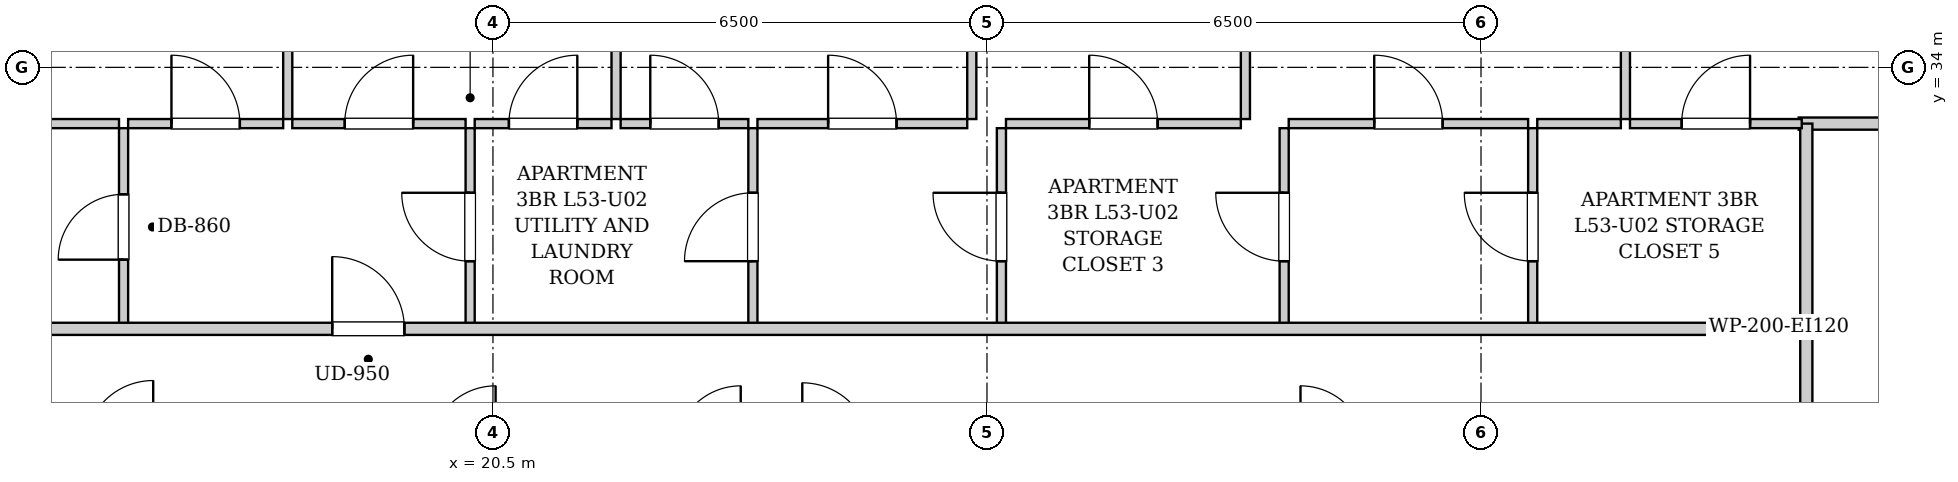
"""IFC4 building model, lengths in metres.
Left out: names, types, materials, properties, quantities, classifications, styles, units other than length and angle.
Written with IfcOpenShell. Run it as: python <this file> out.ifc"""

import sys

from ifc_helpers import new_model, si_unit, direction, frame, frame_2d, origin, place, context, subcontext, project, spatial, rectangle, extrude, element, fill, save


model = new_model("IFC4")
c1 = context("Model", 3, precision=1e-05, world=origin(), true_north=direction((0.0, 1.0)))
c2 = subcontext(c1, "Body", "Model", "MODEL_VIEW")
j1 = project(units=[si_unit("LENGTHUNIT", "METRE"), si_unit("PLANEANGLEUNIT", "RADIAN")], contexts=[c1])
p1 = place(None, origin())
s1 = spatial("IfcSite", under=j1, at=p1, CompositionType="ELEMENT")
p2 = place(p1, origin())
s2 = spatial("IfcBuilding", under=s1, at=p2, CompositionType="ELEMENT")
p3 = place(p2, frame((0.0, 0.0, 184.3)))
s3 = spatial("IfcBuildingStorey", under=s2, at=p3, CompositionType="ELEMENT", Elevation=184.3)
p4 = place(p3, frame((37.78, 28.98, 0.0), z_axis=(0.0, 0.0, 1.0), x_axis=(0.0, 1.0, 0.0)))
e1 = element("IfcWall", 1, at=p4, inside=s3, PredefinedType="PARTITIONING", context=c2, shape_type="SweptSolid", body=[
    extrude(rectangle(XDim=1.58, YDim=0.16, at=frame_2d((0.79, 0.0))), origin(), (0.0, 0.0, 1.0), 3.04),
])
p5 = place(p3, frame((37.68, 33.26, 0.0), z_axis=(0.0, 0.0, 1.0), x_axis=(1.0, 0.0, 0.0)))
e2 = element("IfcWall", 2, at=p5, inside=s3, PredefinedType="PARTITIONING", context=c2, shape_type="SweptSolid", body=[
    extrude(rectangle(XDim=2.34, YDim=0.16, at=frame_2d((1.17, 0.0))), origin(), (0.0, 0.0, 1.0), 3.04),
])
p6 = place(p3, frame((37.78, 30.6, 0.0), z_axis=(0.0, 0.0, 1.0), x_axis=(0.0, 1.0, 0.0)))
e3 = element("IfcWall", 3, at=p6, inside=s3, PredefinedType="PARTITIONING", context=c2, shape_type="SweptSolid", body=[
    extrude(rectangle(XDim=2.66, YDim=0.16, at=frame_2d((1.33, 0.0))), origin(), (0.0, 0.0, 1.0), 3.04),
])
p7 = place(p3, frame((15.64, 30.6, 0.0), z_axis=(0.0, 0.0, 1.0), x_axis=(0.0, 1.0, 0.0)))
e4 = element("IfcWall", 4, at=p7, inside=s3, PredefinedType="PARTITIONING", context=c2, shape_type="SweptSolid", body=[
    extrude(rectangle(XDim=2.6, YDim=0.12, at=frame_2d((1.3, 0.0))), origin(), (0.0, 0.0, 1.0), 3.04),
])
p8 = place(p7, frame((0.87, 0.0, 0.0)))
e5 = element("IfcOpeningElement", 5, at=p8, cuts=e4, PredefinedType="OPENING", context=c2, shape_type="SweptSolid", body=[
    extrude(rectangle(XDim=0.86, YDim=2.05, at=frame_2d((0.43, 1.025))), frame((0.0, 0.07, 0.0), z_axis=(0.0, -1.0, 0.0), x_axis=(1.0, 0.0, 0.0)), (0.0, 0.0, 1.0), 0.14),
])
p9 = place(p3, frame((13.18, 33.26, 0.0), z_axis=(0.0, 0.0, 1.0), x_axis=(1.0, 0.0, 0.0)))
e6 = element("IfcWall", 6, at=p9, inside=s3, PredefinedType="PARTITIONING", context=c2, shape_type="SweptSolid", body=[
    extrude(rectangle(XDim=2.4, YDim=0.12, at=frame_2d((1.2, 0.0))), origin(), (0.0, 0.0, 1.0), 3.04),
])
p10 = place(p3, frame((20.2, 30.6, 0.0), z_axis=(0.0, 0.0, 1.0), x_axis=(0.0, 1.0, 0.0)))
e7 = element("IfcWall", 7, at=p10, inside=s3, PredefinedType="PARTITIONING", context=c2, shape_type="SweptSolid", body=[
    extrude(rectangle(XDim=2.6, YDim=0.12, at=frame_2d((1.3, 0.0))), origin(), (0.0, 0.0, 1.0), 3.04),
])
p11 = place(p10, frame((0.85, 0.0, 0.0)))
e8 = element("IfcOpeningElement", 8, at=p11, cuts=e7, PredefinedType="OPENING", context=c2, shape_type="SweptSolid", body=[
    extrude(rectangle(XDim=0.9, YDim=2.05, at=frame_2d((0.45, 1.025))), frame((0.0, 0.07, 0.0), z_axis=(0.0, -1.0, 0.0), x_axis=(1.0, 0.0, 0.0)), (0.0, 0.0, 1.0), 0.14),
])
p12 = place(p3, frame((15.7, 33.26, 0.0), z_axis=(0.0, 0.0, 1.0), x_axis=(1.0, 0.0, 0.0)))
e9 = element("IfcWall", 9, at=p12, inside=s3, PredefinedType="PARTITIONING", context=c2, shape_type="SweptSolid", body=[
    extrude(rectangle(XDim=2.04, YDim=0.12, at=frame_2d((1.02, 0.0))), origin(), (0.0, 0.0, 1.0), 3.04),
])
p13 = place(p12, frame((0.57, 0.0, 0.0)))
e10 = element("IfcOpeningElement", 10, at=p13, cuts=e9, PredefinedType="OPENING", context=c2, shape_type="SweptSolid", body=[
    extrude(rectangle(XDim=0.9, YDim=2.05, at=frame_2d((0.45, 1.025))), frame((0.0, 0.07, 0.0), z_axis=(0.0, -1.0, 0.0), x_axis=(1.0, 0.0, 0.0)), (0.0, 0.0, 1.0), 0.14),
])
p14 = place(p3, frame((17.86, 33.26, 0.0), z_axis=(0.0, 0.0, 1.0), x_axis=(1.0, 0.0, 0.0)))
e11 = element("IfcWall", 11, at=p14, inside=s3, PredefinedType="PARTITIONING", context=c2, shape_type="SweptSolid", body=[
    extrude(rectangle(XDim=2.28, YDim=0.12, at=frame_2d((1.14, 0.0))), origin(), (0.0, 0.0, 1.0), 3.04),
])
p15 = place(p14, frame((0.69, 0.0, 0.0)))
e12 = element("IfcOpeningElement", 12, at=p15, cuts=e11, PredefinedType="OPENING", context=c2, shape_type="SweptSolid", body=[
    extrude(rectangle(XDim=0.9, YDim=2.05, at=frame_2d((0.45, 1.025))), frame((0.0, 0.07, 0.0), z_axis=(0.0, -1.0, 0.0), x_axis=(1.0, 0.0, 0.0)), (0.0, 0.0, 1.0), 0.14),
])
p16 = place(p3, frame((23.92, 30.6, 0.0), z_axis=(0.0, 0.0, 1.0), x_axis=(0.0, 1.0, 0.0)))
e13 = element("IfcWall", 13, at=p16, inside=s3, PredefinedType="PARTITIONING", context=c2, shape_type="SweptSolid", body=[
    extrude(rectangle(XDim=2.6, YDim=0.12, at=frame_2d((1.3, 0.0))), origin(), (0.0, 0.0, 1.0), 3.04),
])
p17 = place(p16, frame((0.85, 0.0, 0.0)))
e14 = element("IfcOpeningElement", 14, at=p17, cuts=e13, PredefinedType="OPENING", context=c2, shape_type="SweptSolid", body=[
    extrude(rectangle(XDim=0.9, YDim=2.05, at=frame_2d((0.45, 1.025))), frame((0.0, 0.07, 0.0), z_axis=(0.0, -1.0, 0.0), x_axis=(1.0, 0.0, 0.0)), (0.0, 0.0, 1.0), 0.14),
])
p18 = place(p3, frame((20.26, 33.26, 0.0), z_axis=(0.0, 0.0, 1.0), x_axis=(1.0, 0.0, 0.0)))
e15 = element("IfcWall", 15, at=p18, inside=s3, PredefinedType="PARTITIONING", context=c2, shape_type="SweptSolid", body=[
    extrude(rectangle(XDim=1.8, YDim=0.12, at=frame_2d((0.9, 0.0))), origin(), (0.0, 0.0, 1.0), 3.04),
])
p19 = place(p18, frame((0.45, 0.0, 0.0)))
e16 = element("IfcOpeningElement", 16, at=p19, cuts=e15, PredefinedType="OPENING", context=c2, shape_type="SweptSolid", body=[
    extrude(rectangle(XDim=0.9, YDim=2.05, at=frame_2d((0.45, 1.025))), frame((0.0, 0.07, 0.0), z_axis=(0.0, -1.0, 0.0), x_axis=(1.0, 0.0, 0.0)), (0.0, 0.0, 1.0), 0.14),
])
p20 = place(p3, frame((22.18, 33.26, 0.0), z_axis=(0.0, 0.0, 1.0), x_axis=(1.0, 0.0, 0.0)))
e17 = element("IfcWall", 17, at=p20, inside=s3, PredefinedType="PARTITIONING", context=c2, shape_type="SweptSolid", body=[
    extrude(rectangle(XDim=1.68, YDim=0.12, at=frame_2d((0.84, 0.0))), origin(), (0.0, 0.0, 1.0), 3.04),
])
p21 = place(p20, frame((0.39, 0.0, 0.0)))
e18 = element("IfcOpeningElement", 18, at=p21, cuts=e17, PredefinedType="OPENING", context=c2, shape_type="SweptSolid", body=[
    extrude(rectangle(XDim=0.9, YDim=2.05, at=frame_2d((0.45, 1.025))), frame((0.0, 0.07, 0.0), z_axis=(0.0, -1.0, 0.0), x_axis=(1.0, 0.0, 0.0)), (0.0, 0.0, 1.0), 0.14),
])
p22 = place(p3, frame((27.19, 30.6, 0.0), z_axis=(0.0, 0.0, 1.0), x_axis=(0.0, 1.0, 0.0)))
e19 = element("IfcWall", 19, at=p22, inside=s3, PredefinedType="PARTITIONING", context=c2, shape_type="SweptSolid", body=[
    extrude(rectangle(XDim=2.6, YDim=0.12, at=frame_2d((1.3, 0.0))), origin(), (0.0, 0.0, 1.0), 3.04),
])
p23 = place(p22, frame((0.85, 0.0, 0.0)))
e20 = element("IfcOpeningElement", 20, at=p23, cuts=e19, PredefinedType="OPENING", context=c2, shape_type="SweptSolid", body=[
    extrude(rectangle(XDim=0.9, YDim=2.05, at=frame_2d((0.45, 1.025))), frame((0.0, 0.07, 0.0), z_axis=(0.0, -1.0, 0.0), x_axis=(1.0, 0.0, 0.0)), (0.0, 0.0, 1.0), 0.14),
])
p24 = place(p3, frame((23.98, 33.26, 0.0), z_axis=(0.0, 0.0, 1.0), x_axis=(1.0, 0.0, 0.0)))
e21 = element("IfcWall", 21, at=p24, inside=s3, PredefinedType="PARTITIONING", context=c2, shape_type="SweptSolid", body=[
    extrude(rectangle(XDim=2.76, YDim=0.12, at=frame_2d((1.38, 0.0))), origin(), (0.0, 0.0, 1.0), 3.04),
])
p25 = place(p24, frame((0.93, 0.0, 0.0)))
e22 = element("IfcOpeningElement", 22, at=p25, cuts=e21, PredefinedType="OPENING", context=c2, shape_type="SweptSolid", body=[
    extrude(rectangle(XDim=0.9, YDim=2.05, at=frame_2d((0.45, 1.025))), frame((0.0, 0.07, 0.0), z_axis=(0.0, -1.0, 0.0), x_axis=(1.0, 0.0, 0.0)), (0.0, 0.0, 1.0), 0.14),
])
p26 = place(p3, frame((30.91, 30.6, 0.0), z_axis=(0.0, 0.0, 1.0), x_axis=(0.0, 1.0, 0.0)))
e23 = element("IfcWall", 23, at=p26, inside=s3, PredefinedType="PARTITIONING", context=c2, shape_type="SweptSolid", body=[
    extrude(rectangle(XDim=2.6, YDim=0.12, at=frame_2d((1.3, 0.0))), origin(), (0.0, 0.0, 1.0), 3.04),
])
p27 = place(p26, frame((0.85, 0.0, 0.0)))
e24 = element("IfcOpeningElement", 24, at=p27, cuts=e23, PredefinedType="OPENING", context=c2, shape_type="SweptSolid", body=[
    extrude(rectangle(XDim=0.9, YDim=2.05, at=frame_2d((0.45, 1.025))), frame((0.0, 0.07, 0.0), z_axis=(0.0, -1.0, 0.0), x_axis=(1.0, 0.0, 0.0)), (0.0, 0.0, 1.0), 0.14),
])
p28 = place(p3, frame((27.25, 33.26, 0.0), z_axis=(0.0, 0.0, 1.0), x_axis=(1.0, 0.0, 0.0)))
e25 = element("IfcWall", 25, at=p28, inside=s3, PredefinedType="PARTITIONING", context=c2, shape_type="SweptSolid", body=[
    extrude(rectangle(XDim=3.09, YDim=0.12, at=frame_2d((1.545, 0.0))), origin(), (0.0, 0.0, 1.0), 3.04),
])
p29 = place(p28, frame((1.095, 0.0, 0.0)))
e26 = element("IfcOpeningElement", 26, at=p29, cuts=e25, PredefinedType="OPENING", context=c2, shape_type="SweptSolid", body=[
    extrude(rectangle(XDim=0.9, YDim=2.05, at=frame_2d((0.45, 1.025))), frame((0.0, 0.07, 0.0), z_axis=(0.0, -1.0, 0.0), x_axis=(1.0, 0.0, 0.0)), (0.0, 0.0, 1.0), 0.14),
])
p30 = place(p3, frame((34.18, 30.6, 0.0), z_axis=(0.0, 0.0, 1.0), x_axis=(0.0, 1.0, 0.0)))
e27 = element("IfcWall", 27, at=p30, inside=s3, PredefinedType="PARTITIONING", context=c2, shape_type="SweptSolid", body=[
    extrude(rectangle(XDim=2.6, YDim=0.12, at=frame_2d((1.3, 0.0))), origin(), (0.0, 0.0, 1.0), 3.04),
])
p31 = place(p30, frame((0.85, 0.0, 0.0)))
e28 = element("IfcOpeningElement", 28, at=p31, cuts=e27, PredefinedType="OPENING", context=c2, shape_type="SweptSolid", body=[
    extrude(rectangle(XDim=0.9, YDim=2.05, at=frame_2d((0.45, 1.025))), frame((0.0, 0.07, 0.0), z_axis=(0.0, -1.0, 0.0), x_axis=(1.0, 0.0, 0.0)), (0.0, 0.0, 1.0), 0.14),
])
p32 = place(p3, frame((30.97, 33.26, 0.0), z_axis=(0.0, 0.0, 1.0), x_axis=(1.0, 0.0, 0.0)))
e29 = element("IfcWall", 29, at=p32, inside=s3, PredefinedType="PARTITIONING", context=c2, shape_type="SweptSolid", body=[
    extrude(rectangle(XDim=3.15, YDim=0.12, at=frame_2d((1.575, 0.0))), origin(), (0.0, 0.0, 1.0), 3.04),
])
p33 = place(p32, frame((1.125, 0.0, 0.0)))
e30 = element("IfcOpeningElement", 30, at=p33, cuts=e29, PredefinedType="OPENING", context=c2, shape_type="SweptSolid", body=[
    extrude(rectangle(XDim=0.9, YDim=2.05, at=frame_2d((0.45, 1.025))), frame((0.0, 0.07, 0.0), z_axis=(0.0, -1.0, 0.0), x_axis=(1.0, 0.0, 0.0)), (0.0, 0.0, 1.0), 0.14),
])
p34 = place(p3, frame((34.24, 33.26, 0.0), z_axis=(0.0, 0.0, 1.0), x_axis=(1.0, 0.0, 0.0)))
e31 = element("IfcWall", 31, at=p34, inside=s3, PredefinedType="PARTITIONING", context=c2, shape_type="SweptSolid", body=[
    extrude(rectangle(XDim=1.1, YDim=0.12, at=frame_2d((0.55, 0.0))), origin(), (0.0, 0.0, 1.0), 3.04),
])
p35 = place(p3, frame((35.46, 33.26, 0.0), z_axis=(0.0, 0.0, 1.0), x_axis=(1.0, 0.0, 0.0)))
e32 = element("IfcWall", 32, at=p35, inside=s3, PredefinedType="PARTITIONING", context=c2, shape_type="SweptSolid", body=[
    extrude(rectangle(XDim=2.26, YDim=0.12, at=frame_2d((1.13, 0.0))), origin(), (0.0, 0.0, 1.0), 3.04),
])
p36 = place(p35, frame((0.68, 0.0, 0.0)))
e33 = element("IfcOpeningElement", 33, at=p36, cuts=e32, PredefinedType="OPENING", context=c2, shape_type="SweptSolid", body=[
    extrude(rectangle(XDim=0.9, YDim=2.05, at=frame_2d((0.45, 1.025))), frame((0.0, 0.07, 0.0), z_axis=(0.0, -1.0, 0.0), x_axis=(1.0, 0.0, 0.0)), (0.0, 0.0, 1.0), 0.14),
])
p37 = place(p3, frame((17.8, 33.32, 0.0), z_axis=(0.0, 0.0, 1.0), x_axis=(0.0, 1.0, 0.0)))
e34 = element("IfcWall", 34, at=p37, inside=s3, PredefinedType="PARTITIONING", context=c2, shape_type="SweptSolid", body=[
    extrude(rectangle(XDim=6.6, YDim=0.12, at=frame_2d((3.3, 0.0))), origin(), (0.0, 0.0, 1.0), 2.556),
])
p38 = place(p37, frame((2.835, 0.0, 0.0)))
e35 = element("IfcOpeningElement", 35, at=p38, cuts=e34, PredefinedType="OPENING", context=c2, shape_type="SweptSolid", body=[
    extrude(rectangle(XDim=0.9, YDim=2.05, at=frame_2d((0.45, 1.025))), frame((0.0, 0.07, 0.0), z_axis=(0.0, -1.0, 0.0), x_axis=(1.0, 0.0, 0.0)), (0.0, 0.0, 1.0), 0.14),
])
p39 = place(p3, frame((22.12, 33.32, 0.0), z_axis=(0.0, 0.0, 1.0), x_axis=(0.0, 1.0, 0.0)))
e36 = element("IfcWall", 36, at=p39, inside=s3, PredefinedType="PARTITIONING", context=c2, shape_type="SweptSolid", body=[
    extrude(rectangle(XDim=6.6, YDim=0.12, at=frame_2d((3.3, 0.0))), origin(), (0.0, 0.0, 1.0), 3.04),
])
p40 = place(p39, frame((2.835, 0.0, 0.0)))
e37 = element("IfcOpeningElement", 37, at=p40, cuts=e36, PredefinedType="OPENING", context=c2, shape_type="SweptSolid", body=[
    extrude(rectangle(XDim=0.9, YDim=2.05, at=frame_2d((0.45, 1.025))), frame((0.0, 0.07, 0.0), z_axis=(0.0, -1.0, 0.0), x_axis=(1.0, 0.0, 0.0)), (0.0, 0.0, 1.0), 0.14),
])
p41 = place(p3, frame((26.8, 33.32, 0.0), z_axis=(0.0, 0.0, 1.0), x_axis=(0.0, 1.0, 0.0)))
e38 = element("IfcWall", 38, at=p41, inside=s3, PredefinedType="PARTITIONING", context=c2, shape_type="SweptSolid", body=[
    extrude(rectangle(XDim=6.6, YDim=0.12, at=frame_2d((3.3, 0.0))), origin(), (0.0, 0.0, 1.0), 3.04),
])
p42 = place(p41, frame((2.835, 0.0, 0.0)))
e39 = element("IfcOpeningElement", 39, at=p42, cuts=e38, PredefinedType="OPENING", context=c2, shape_type="SweptSolid", body=[
    extrude(rectangle(XDim=0.9, YDim=2.05, at=frame_2d((0.45, 1.025))), frame((0.0, 0.07, 0.0), z_axis=(0.0, -1.0, 0.0), x_axis=(1.0, 0.0, 0.0)), (0.0, 0.0, 1.0), 0.14),
])
p43 = place(p3, frame((30.4, 33.32, 0.0), z_axis=(0.0, 0.0, 1.0), x_axis=(0.0, 1.0, 0.0)))
e40 = element("IfcWall", 40, at=p43, inside=s3, PredefinedType="PARTITIONING", context=c2, shape_type="SweptSolid", body=[
    extrude(rectangle(XDim=4.45, YDim=0.12, at=frame_2d((2.225, 0.0))), origin(), (0.0, 0.0, 1.0), 3.04),
])
p44 = place(p43, frame((1.775, 0.0, 0.0)))
e41 = element("IfcOpeningElement", 41, at=p44, cuts=e40, PredefinedType="OPENING", context=c2, shape_type="SweptSolid", body=[
    extrude(rectangle(XDim=0.9, YDim=2.05, at=frame_2d((0.45, 1.025))), frame((0.0, 0.07, 0.0), z_axis=(0.0, -1.0, 0.0), x_axis=(1.0, 0.0, 0.0)), (0.0, 0.0, 1.0), 0.14),
])
p45 = place(p3, frame((35.4, 33.32, 0.0), z_axis=(0.0, 0.0, 1.0), x_axis=(0.0, 1.0, 0.0)))
e42 = element("IfcWall", 42, at=p45, inside=s3, PredefinedType="PARTITIONING", context=c2, shape_type="SweptSolid", body=[
    extrude(rectangle(XDim=4.45, YDim=0.12, at=frame_2d((2.225, 0.0))), origin(), (0.0, 0.0, 1.0), 3.04),
])
p46 = place(p45, frame((1.775, 0.0, 0.0)))
e43 = element("IfcOpeningElement", 43, at=p46, cuts=e42, PredefinedType="OPENING", context=c2, shape_type="SweptSolid", body=[
    extrude(rectangle(XDim=0.9, YDim=2.05, at=frame_2d((0.45, 1.025))), frame((0.0, 0.07, 0.0), z_axis=(0.0, -1.0, 0.0), x_axis=(1.0, 0.0, 0.0)), (0.0, 0.0, 1.0), 0.14),
])
p47 = place(p3, frame((13.15, 30.56, 0.0), z_axis=(0.0, 0.0, 1.0), x_axis=(1.0, 0.0, 0.0)))
e44 = element("IfcWall", 44, at=p47, inside=s3, PredefinedType="PARTITIONING", context=c2, shape_type="SweptSolid", body=[
    extrude(rectangle(XDim=24.6, YDim=0.16, at=frame_2d((12.3, 0.0))), origin(), (0.0, 0.0, 1.0), 3.04),
])
p48 = place(p47, frame((5.235, 0.0, 0.0)))
e45 = element("IfcOpeningElement", 45, at=p48, cuts=e44, PredefinedType="OPENING", context=c2, shape_type="SweptSolid", body=[
    extrude(rectangle(XDim=0.95, YDim=2.1, at=frame_2d((0.475, 1.05))), frame((0.0, 0.09, 0.0), z_axis=(0.0, -1.0, 0.0), x_axis=(1.0, 0.0, 0.0)), (0.0, 0.0, 1.0), 0.18),
])
p49 = place(p8, origin())
e46 = element("IfcDoor", 46, at=p49, inside=s3, OperationType="SINGLE_SWING_LEFT", PredefinedType="DOOR", context=c2, shape_type="SweptSolid", body=[
    extrude(rectangle(XDim=0.86, YDim=2.05, at=frame_2d((0.43, 1.025))), frame((0.0, 0.025, 0.0), z_axis=(0.0, -1.0, 0.0), x_axis=(1.0, 0.0, 0.0)), (0.0, 0.0, 1.0), 0.05),
])
fill(e5, e46)
p50 = place(p11, origin())
e47 = element("IfcDoor", 47, at=p50, inside=s3, OperationType="SINGLE_SWING_RIGHT", PredefinedType="DOOR", context=c2, shape_type="SweptSolid", body=[
    extrude(rectangle(XDim=0.9, YDim=2.05, at=frame_2d((0.45, 1.025))), frame((0.0, 0.025, 0.0), z_axis=(0.0, -1.0, 0.0), x_axis=(1.0, 0.0, 0.0)), (0.0, 0.0, 1.0), 0.05),
])
fill(e8, e47)
p51 = place(p13, origin())
e48 = element("IfcDoor", 48, at=p51, inside=s3, OperationType="SINGLE_SWING_LEFT", PredefinedType="DOOR", context=c2, shape_type="SweptSolid", body=[
    extrude(rectangle(XDim=0.9, YDim=2.05, at=frame_2d((0.45, 1.025))), frame((0.0, 0.025, 0.0), z_axis=(0.0, -1.0, 0.0), x_axis=(1.0, 0.0, 0.0)), (0.0, 0.0, 1.0), 0.05),
])
fill(e10, e48)
p52 = place(p15, origin())
e49 = element("IfcDoor", 49, at=p52, inside=s3, OperationType="SINGLE_SWING_RIGHT", PredefinedType="DOOR", context=c2, shape_type="SweptSolid", body=[
    extrude(rectangle(XDim=0.9, YDim=2.05, at=frame_2d((0.45, 1.025))), frame((0.0, 0.025, 0.0), z_axis=(0.0, -1.0, 0.0), x_axis=(1.0, 0.0, 0.0)), (0.0, 0.0, 1.0), 0.05),
])
fill(e12, e49)
p53 = place(p17, origin())
e50 = element("IfcDoor", 50, at=p53, inside=s3, OperationType="SINGLE_SWING_LEFT", PredefinedType="DOOR", context=c2, shape_type="SweptSolid", body=[
    extrude(rectangle(XDim=0.9, YDim=2.05, at=frame_2d((0.45, 1.025))), frame((0.0, 0.025, 0.0), z_axis=(0.0, -1.0, 0.0), x_axis=(1.0, 0.0, 0.0)), (0.0, 0.0, 1.0), 0.05),
])
fill(e14, e50)
p54 = place(p19, origin())
e51 = element("IfcDoor", 51, at=p54, inside=s3, OperationType="SINGLE_SWING_RIGHT", PredefinedType="DOOR", context=c2, shape_type="SweptSolid", body=[
    extrude(rectangle(XDim=0.9, YDim=2.05, at=frame_2d((0.45, 1.025))), frame((0.0, 0.025, 0.0), z_axis=(0.0, -1.0, 0.0), x_axis=(1.0, 0.0, 0.0)), (0.0, 0.0, 1.0), 0.05),
])
fill(e16, e51)
p55 = place(p21, origin())
e52 = element("IfcDoor", 52, at=p55, inside=s3, OperationType="SINGLE_SWING_LEFT", PredefinedType="DOOR", context=c2, shape_type="SweptSolid", body=[
    extrude(rectangle(XDim=0.9, YDim=2.05, at=frame_2d((0.45, 1.025))), frame((0.0, 0.025, 0.0), z_axis=(0.0, -1.0, 0.0), x_axis=(1.0, 0.0, 0.0)), (0.0, 0.0, 1.0), 0.05),
])
fill(e18, e52)
p56 = place(p23, origin())
e53 = element("IfcDoor", 53, at=p56, inside=s3, OperationType="SINGLE_SWING_RIGHT", PredefinedType="DOOR", context=c2, shape_type="SweptSolid", body=[
    extrude(rectangle(XDim=0.9, YDim=2.05, at=frame_2d((0.45, 1.025))), frame((0.0, 0.025, 0.0), z_axis=(0.0, -1.0, 0.0), x_axis=(1.0, 0.0, 0.0)), (0.0, 0.0, 1.0), 0.05),
])
fill(e20, e53)
p57 = place(p25, origin())
e54 = element("IfcDoor", 54, at=p57, inside=s3, OperationType="SINGLE_SWING_LEFT", PredefinedType="DOOR", context=c2, shape_type="SweptSolid", body=[
    extrude(rectangle(XDim=0.9, YDim=2.05, at=frame_2d((0.45, 1.025))), frame((0.0, 0.025, 0.0), z_axis=(0.0, -1.0, 0.0), x_axis=(1.0, 0.0, 0.0)), (0.0, 0.0, 1.0), 0.05),
])
fill(e22, e54)
p58 = place(p27, origin())
e55 = element("IfcDoor", 55, at=p58, inside=s3, OperationType="SINGLE_SWING_RIGHT", PredefinedType="DOOR", context=c2, shape_type="SweptSolid", body=[
    extrude(rectangle(XDim=0.9, YDim=2.05, at=frame_2d((0.45, 1.025))), frame((0.0, 0.025, 0.0), z_axis=(0.0, -1.0, 0.0), x_axis=(1.0, 0.0, 0.0)), (0.0, 0.0, 1.0), 0.05),
])
fill(e24, e55)
p59 = place(p29, origin())
e56 = element("IfcDoor", 56, at=p59, inside=s3, OperationType="SINGLE_SWING_LEFT", PredefinedType="DOOR", context=c2, shape_type="SweptSolid", body=[
    extrude(rectangle(XDim=0.9, YDim=2.05, at=frame_2d((0.45, 1.025))), frame((0.0, 0.025, 0.0), z_axis=(0.0, -1.0, 0.0), x_axis=(1.0, 0.0, 0.0)), (0.0, 0.0, 1.0), 0.05),
])
fill(e26, e56)
p60 = place(p31, origin())
e57 = element("IfcDoor", 57, at=p60, inside=s3, OperationType="SINGLE_SWING_RIGHT", PredefinedType="DOOR", context=c2, shape_type="SweptSolid", body=[
    extrude(rectangle(XDim=0.9, YDim=2.05, at=frame_2d((0.45, 1.025))), frame((0.0, 0.025, 0.0), z_axis=(0.0, -1.0, 0.0), x_axis=(1.0, 0.0, 0.0)), (0.0, 0.0, 1.0), 0.05),
])
fill(e28, e57)
p61 = place(p33, origin())
e58 = element("IfcDoor", 58, at=p61, inside=s3, OperationType="SINGLE_SWING_LEFT", PredefinedType="DOOR", context=c2, shape_type="SweptSolid", body=[
    extrude(rectangle(XDim=0.9, YDim=2.05, at=frame_2d((0.45, 1.025))), frame((0.0, 0.025, 0.0), z_axis=(0.0, -1.0, 0.0), x_axis=(1.0, 0.0, 0.0)), (0.0, 0.0, 1.0), 0.05),
])
fill(e30, e58)
p62 = place(p36, origin())
e59 = element("IfcDoor", 59, at=p62, inside=s3, OperationType="SINGLE_SWING_RIGHT", PredefinedType="DOOR", context=c2, shape_type="SweptSolid", body=[
    extrude(rectangle(XDim=0.9, YDim=2.05, at=frame_2d((0.45, 1.025))), frame((0.0, 0.025, 0.0), z_axis=(0.0, -1.0, 0.0), x_axis=(1.0, 0.0, 0.0)), (0.0, 0.0, 1.0), 0.05),
])
fill(e33, e59)
p63 = place(p48, origin())
e60 = element("IfcDoor", 60, at=p63, inside=s3, OperationType="SINGLE_SWING_LEFT", PredefinedType="DOOR", context=c2, shape_type="SweptSolid", body=[
    extrude(rectangle(XDim=0.95, YDim=2.1, at=frame_2d((0.475, 1.05))), frame((0.0, 0.025, 0.0), z_axis=(0.0, -1.0, 0.0), x_axis=(1.0, 0.0, 0.0)), (0.0, 0.0, 1.0), 0.05),
])
fill(e45, e60)
save(model, sys.argv[1])
